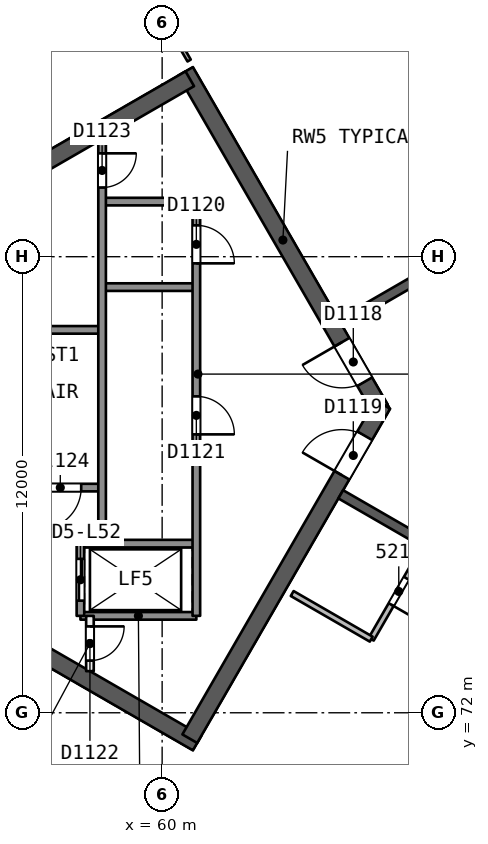
"""IFC4 building model, lengths in metres.
Left out: names, types, materials, properties, quantities, classifications, styles, units other than length and angle.
Written with IfcOpenShell. Run it as: python <this file> out.ifc"""

import sys

from ifc_helpers import new_model, si_unit, direction, frame, frame_2d, origin, place, context, subcontext, project, spatial, rectangle, extrude, element, fill, save


model = new_model("IFC4")
c1 = context("Model", 3, precision=1e-05, world=origin(), true_north=direction((0.0, 1.0)))
c2 = subcontext(c1, "Body", "Model", "MODEL_VIEW")
j1 = project(units=[si_unit("LENGTHUNIT", "METRE"), si_unit("PLANEANGLEUNIT", "RADIAN")], contexts=[c1])
p1 = place(None, origin())
s1 = spatial("IfcSite", under=j1, at=p1, CompositionType="ELEMENT")
p2 = place(p1, origin())
s2 = spatial("IfcBuilding", under=s1, at=p2, CompositionType="ELEMENT")
p3 = place(p2, frame((0.0, 0.0, 213.2)))
s3 = spatial("IfcBuildingStorey", under=s2, at=p3, CompositionType="ELEMENT", Elevation=213.2)
p4 = place(p3, frame((65.74, 80.0, 0.0), z_axis=(0.0, 0.0, 1.0), x_axis=(-0.499991857942, 0.866030104553, 0.0)))
e1 = element("IfcWall", 1, at=p4, inside=s3, PredefinedType="SHEAR", context=c2, shape_type="SweptSolid", body=[
    extrude(rectangle(XDim=10.25, YDim=0.45, at=frame_2d((5.125, 0.0))), origin(), (0.0, 0.0, 1.0), 3.7),
])
p5 = place(p4, frame((0.82, 0.0, 0.0)))
e2 = element("IfcOpeningElement", 2, at=p5, cuts=e1, PredefinedType="OPENING", context=c2, shape_type="SweptSolid", body=[
    extrude(rectangle(XDim=1.2, YDim=2.1, at=frame_2d((0.6, 1.05))), frame((0.0, 0.235, 0.0), z_axis=(0.0, -1.0, 0.0), x_axis=(1.0, 0.0, 0.0)), (0.0, 0.0, 1.0), 0.471),
])
p6 = place(p3, frame((60.728, 88.682, 0.0), z_axis=(0.0, 0.0, 1.0), x_axis=(-0.866021613849, -0.500006564303, 0.0)))
e3 = element("IfcWall", 3, at=p6, inside=s3, PredefinedType="SHEAR", context=c2, shape_type="SweptSolid", body=[
    extrude(rectangle(XDim=14.108, YDim=0.45, at=frame_2d((7.054, 0.0))), origin(), (0.0, 0.0, 1.0), 3.7),
])
p7 = place(p3, frame((48.622, 78.307, 0.0), z_axis=(0.0, 0.0, 1.0), x_axis=(0.86602701116, -0.499997215934, 0.0)))
e4 = element("IfcWall", 4, at=p7, inside=s3, PredefinedType="SHEAR", context=c2, shape_type="SweptSolid", body=[
    extrude(rectangle(XDim=14.204, YDim=0.45, at=frame_2d((7.102, 0.0))), origin(), (0.0, 0.0, 1.0), 3.7),
])
p8 = place(p3, frame((60.728, 71.318, 0.0), z_axis=(0.0, 0.0, 1.0), x_axis=(0.500012416173, 0.866018235185, 0.0)))
e5 = element("IfcWall", 5, at=p8, inside=s3, PredefinedType="SHEAR", context=c2, shape_type="SweptSolid", body=[
    extrude(rectangle(XDim=10.155, YDim=0.45, at=frame_2d((5.078, 0.0))), origin(), (0.0, 0.0, 1.0), 3.7),
])
p9 = place(p8, frame((8.005, 0.0, 0.0)))
e6 = element("IfcOpeningElement", 6, at=p9, cuts=e5, PredefinedType="OPENING", context=c2, shape_type="SweptSolid", body=[
    extrude(rectangle(XDim=1.2, YDim=2.1, at=frame_2d((0.6, 1.05))), frame((0.0, 0.235, 0.0), z_axis=(0.0, -1.0, 0.0), x_axis=(1.0, 0.0, 0.0)), (0.0, 0.0, 1.0), 0.471),
])
p10 = place(p3, frame((78.2, 90.046, 0.0), z_axis=(0.0, 0.0, 1.0), x_axis=(-0.866026492143, -0.499998114903, 0.0)))
e7 = element("IfcWall", 7, at=p10, inside=s3, PredefinedType="SHEAR", context=c2, shape_type="SweptSolid", body=[
    extrude(rectangle(XDim=15.588, YDim=0.25, at=frame_2d((7.794, 0.0))), origin(), (0.0, 0.0, 1.0), 3.3),
])
p11 = place(p10, frame((2.462, 0.0, 0.0)))
e8 = element("IfcOpeningElement", 8, at=p11, cuts=e7, PredefinedType="OPENING", context=c2, shape_type="SweptSolid", body=[
    extrude(rectangle(XDim=1.0, YDim=2.1, at=frame_2d((0.5, 1.05))), frame((0.0, 0.135, 0.0), z_axis=(0.0, -1.0, 0.0), x_axis=(1.0, 0.0, 0.0)), (0.0, 0.0, 1.0), 0.271),
])
p12 = place(p10, frame((8.003, 0.0, 0.0)))
e9 = element("IfcOpeningElement", 9, at=p12, cuts=e7, PredefinedType="OPENING", context=c2, shape_type="SweptSolid", body=[
    extrude(rectangle(XDim=1.1, YDim=2.1, at=frame_2d((0.55, 1.05))), frame((0.0, 0.135, 0.0), z_axis=(0.0, -1.0, 0.0), x_axis=(1.0, 0.0, 0.0)), (0.0, 0.0, 1.0), 0.271),
])
p13 = place(p10, frame((11.971, 0.0, 0.0)))
e10 = element("IfcOpeningElement", 10, at=p13, cuts=e7, PredefinedType="OPENING", context=c2, shape_type="SweptSolid", body=[
    extrude(rectangle(XDim=1.0, YDim=2.1, at=frame_2d((0.5, 1.05))), frame((0.0, 0.135, 0.0), z_axis=(0.0, -1.0, 0.0), x_axis=(1.0, 0.0, 0.0)), (0.0, 0.0, 1.0), 0.271),
])
p14 = place(p3, frame((64.7, 77.748, 0.0), z_axis=(0.0, 0.0, 1.0), x_axis=(0.866026492143, -0.499998114903, 0.0)))
e11 = element("IfcWall", 11, at=p14, inside=s3, PredefinedType="SHEAR", context=c2, shape_type="SweptSolid", body=[
    extrude(rectangle(XDim=15.588, YDim=0.25, at=frame_2d((7.794, 0.0))), origin(), (0.0, 0.0, 1.0), 3.3),
])
p15 = place(p14, frame((3.45, 0.0, 0.0)))
e12 = element("IfcOpeningElement", 12, at=p15, cuts=e11, PredefinedType="OPENING", context=c2, shape_type="SweptSolid", body=[
    extrude(rectangle(XDim=1.0, YDim=2.1, at=frame_2d((0.5, 1.05))), frame((0.0, 0.135, 0.0), z_axis=(0.0, -1.0, 0.0), x_axis=(1.0, 0.0, 0.0)), (0.0, 0.0, 1.0), 0.271),
])
p16 = place(p14, frame((8.003, 0.0, 0.0)))
e13 = element("IfcOpeningElement", 13, at=p16, cuts=e11, PredefinedType="OPENING", context=c2, shape_type="SweptSolid", body=[
    extrude(rectangle(XDim=1.1, YDim=2.1, at=frame_2d((0.55, 1.05))), frame((0.0, 0.135, 0.0), z_axis=(0.0, -1.0, 0.0), x_axis=(1.0, 0.0, 0.0)), (0.0, 0.0, 1.0), 0.271),
])
p17 = place(p14, frame((11.971, 0.0, 0.0)))
e14 = element("IfcOpeningElement", 14, at=p17, cuts=e11, PredefinedType="OPENING", context=c2, shape_type="SweptSolid", body=[
    extrude(rectangle(XDim=1.0, YDim=2.1, at=frame_2d((0.5, 1.05))), frame((0.0, 0.135, 0.0), z_axis=(0.0, -1.0, 0.0), x_axis=(1.0, 0.0, 0.0)), (0.0, 0.0, 1.0), 0.271),
])
p18 = place(p3, frame((64.824, 94.508, 0.0), z_axis=(0.0, 0.0, 1.0), x_axis=(0.500010840071, -0.866019145176, 0.0)))
e15 = element("IfcWall", 15, at=p18, inside=s3, PredefinedType="PARTITIONING", context=c2, shape_type="SweptSolid", body=[
    extrude(rectangle(XDim=10.552, YDim=0.2, at=frame_2d((5.276, 0.0))), origin(), (0.0, 0.0, 1.0), 3.3),
])
p19 = place(p3, frame((59.424, 91.39, 0.0), z_axis=(0.0, 0.0, 1.0), x_axis=(0.49995513091, -0.866051307416, 0.0)))
e16 = element("IfcWall", 16, at=p19, inside=s3, PredefinedType="PARTITIONING", context=c2, shape_type="SweptSolid", body=[
    extrude(rectangle(XDim=2.573, YDim=0.1, at=frame_2d((1.287, 0.0))), origin(), (0.0, 0.0, 1.0), 3.3),
])
p20 = place(p19, frame((0.837, 0.0, 0.0)))
e17 = element("IfcOpeningElement", 17, at=p20, cuts=e16, PredefinedType="OPENING", context=c2, shape_type="SweptSolid", body=[
    extrude(rectangle(XDim=0.9, YDim=2.1, at=frame_2d((0.45, 1.05))), frame((0.0, 0.061, 0.0), z_axis=(0.0, -1.0, 0.0), x_axis=(1.0, 0.0, 0.0)), (0.0, 0.0, 1.0), 0.121),
])
p21 = place(p3, frame((66.952, 76.448, 0.0), z_axis=(0.0, 0.0, 1.0), x_axis=(-0.499987231761, -0.866032775405, 0.0)))
e18 = element("IfcWall", 18, at=p21, inside=s3, PredefinedType="PARTITIONING", context=c2, shape_type="SweptSolid", body=[
    extrude(rectangle(XDim=2.9, YDim=0.15, at=frame_2d((1.45, 0.0))), origin(), (0.0, 0.0, 1.0), 3.3),
])
p22 = place(p21, frame((1.05, 0.0, 0.0)))
e19 = element("IfcOpeningElement", 19, at=p22, cuts=e18, PredefinedType="OPENING", context=c2, shape_type="SweptSolid", body=[
    extrude(rectangle(XDim=0.8, YDim=2.1, at=frame_2d((0.4, 1.05))), frame((0.0, 0.085, 0.0), z_axis=(0.0, -1.0, 0.0), x_axis=(1.0, 0.0, 0.0)), (0.0, 0.0, 1.0), 0.171),
])
p23 = place(p3, frame((65.502, 73.937, 0.0), z_axis=(0.0, 0.0, 1.0), x_axis=(-0.865994240961, 0.500053971709, 0.0)))
e20 = element("IfcWall", 20, at=p23, inside=s3, PredefinedType="PARTITIONING", context=c2, shape_type="SweptSolid", body=[
    extrude(rectangle(XDim=2.401, YDim=0.15, at=frame_2d((1.201, 0.0))), origin(), (0.0, 0.0, 1.0), 3.3),
])
p24 = place(p3, frame((64.014, 65.96, 0.0), z_axis=(0.0, 0.0, 1.0), x_axis=(0.499980879723, 0.8660364426, 0.0)))
e21 = element("IfcWall", 21, at=p24, inside=s3, PredefinedType="PARTITIONING", context=c2, shape_type="SweptSolid", body=[
    extrude(rectangle(XDim=7.006, YDim=0.2, at=frame_2d((3.503, 0.0))), origin(), (0.0, 0.0, 1.0), 3.3),
])
p25 = place(p3, frame((43.933, 82.619, 0.0), z_axis=(0.0, 0.0, 1.0), x_axis=(0.866026349667, 0.49999836168, 0.0)))
e22 = element("IfcWall", 22, at=p25, inside=s3, PredefinedType="SOLIDWALL", context=c2, shape_type="SweptSolid", body=[
    extrude(rectangle(XDim=51.192, YDim=0.3, at=frame_2d((25.596, 0.0))), origin(), (0.0, 0.0, 1.0), 3.3),
])
p26 = place(p25, frame((24.552, 0.0, 0.0)))
e23 = element("IfcOpeningElement", 23, at=p26, cuts=e22, PredefinedType="OPENING", context=c2, shape_type="SweptSolid", body=[
    extrude(rectangle(XDim=2.4, YDim=2.4, at=frame_2d((1.2, 1.2))), frame((0.0, 0.161, 0.0), z_axis=(0.0, -1.0, 0.0), x_axis=(1.0, 0.0, 0.0)), (0.0, 0.0, 1.0), 0.321),
])
p27 = place(p25, frame((29.228, 0.0, 0.0)))
e24 = element("IfcOpeningElement", 24, at=p27, cuts=e22, PredefinedType="OPENING", context=c2, shape_type="SweptSolid", body=[
    extrude(rectangle(XDim=2.4, YDim=2.4, at=frame_2d((1.2, 1.2))), frame((0.0, 0.161, 0.0), z_axis=(0.0, -1.0, 0.0), x_axis=(1.0, 0.0, 0.0)), (0.0, 0.0, 1.0), 0.321),
])
p28 = place(p25, frame((39.819, 0.0, 0.0)))
e25 = element("IfcOpeningElement", 25, at=p28, cuts=e22, PredefinedType="OPENING", context=c2, shape_type="SweptSolid", body=[
    extrude(rectangle(XDim=2.4, YDim=2.4, at=frame_2d((1.2, 1.2))), frame((0.0, 0.161, 0.0), z_axis=(0.0, -1.0, 0.0), x_axis=(1.0, 0.0, 0.0)), (0.0, 0.0, 1.0), 0.321),
])
p29 = place(p25, frame((19.719, 0.0, 0.0)))
e26 = element("IfcOpeningElement", 26, at=p29, cuts=e22, PredefinedType="OPENING", context=c2, shape_type="SweptSolid", body=[
    extrude(rectangle(XDim=2.4, YDim=2.4, at=frame_2d((1.2, 1.2))), frame((0.0, 0.161, 0.0), z_axis=(0.0, -1.0, 0.0), x_axis=(1.0, 0.0, 0.0)), (0.0, 0.0, 1.0), 0.321),
])
p30 = place(p25, frame((8.993, 0.0, 0.0)))
e27 = element("IfcOpeningElement", 27, at=p30, cuts=e22, PredefinedType="OPENING", context=c2, shape_type="SweptSolid", body=[
    extrude(rectangle(XDim=2.4, YDim=2.4, at=frame_2d((1.2, 1.2))), frame((0.0, 0.161, 0.0), z_axis=(0.0, -1.0, 0.0), x_axis=(1.0, 0.0, 0.0)), (0.0, 0.0, 1.0), 0.321),
])
p31 = place(p3, frame((88.266, 51.786, 0.0), z_axis=(0.0, 0.0, 1.0), x_axis=(-0.866026349667, 0.49999836168, 0.0)))
e28 = element("IfcWall", 28, at=p31, inside=s3, PredefinedType="SOLIDWALL", context=c2, shape_type="SweptSolid", body=[
    extrude(rectangle(XDim=51.192, YDim=0.3, at=frame_2d((25.596, 0.0))), origin(), (0.0, 0.0, 1.0), 3.3),
])
p32 = place(p31, frame((24.864, 0.0, 0.0)))
e29 = element("IfcOpeningElement", 29, at=p32, cuts=e28, PredefinedType="OPENING", context=c2, shape_type="SweptSolid", body=[
    extrude(rectangle(XDim=2.4, YDim=2.4, at=frame_2d((1.2, 1.2))), frame((0.0, 0.161, 0.0), z_axis=(0.0, -1.0, 0.0), x_axis=(1.0, 0.0, 0.0)), (0.0, 0.0, 1.0), 0.321),
])
p33 = place(p31, frame((19.719, 0.0, 0.0)))
e30 = element("IfcOpeningElement", 30, at=p33, cuts=e28, PredefinedType="OPENING", context=c2, shape_type="SweptSolid", body=[
    extrude(rectangle(XDim=2.4, YDim=2.4, at=frame_2d((1.2, 1.2))), frame((0.0, 0.161, 0.0), z_axis=(0.0, -1.0, 0.0), x_axis=(1.0, 0.0, 0.0)), (0.0, 0.0, 1.0), 0.321),
])
p34 = place(p31, frame((8.993, 0.0, 0.0)))
e31 = element("IfcOpeningElement", 31, at=p34, cuts=e28, PredefinedType="OPENING", context=c2, shape_type="SweptSolid", body=[
    extrude(rectangle(XDim=2.4, YDim=2.4, at=frame_2d((1.2, 1.2))), frame((0.0, 0.161, 0.0), z_axis=(0.0, -1.0, 0.0), x_axis=(1.0, 0.0, 0.0)), (0.0, 0.0, 1.0), 0.321),
])
p35 = place(p31, frame((38.484, 0.0, 0.0)))
e32 = element("IfcOpeningElement", 32, at=p35, cuts=e28, PredefinedType="OPENING", context=c2, shape_type="SweptSolid", body=[
    extrude(rectangle(XDim=2.4, YDim=2.4, at=frame_2d((1.2, 1.2))), frame((0.0, 0.161, 0.0), z_axis=(0.0, -1.0, 0.0), x_axis=(1.0, 0.0, 0.0)), (0.0, 0.0, 1.0), 0.321),
])
for number, where, z_axis, x_axis in (
    (33, (60.9, 85.45, 0.0), (0.0, 0.0, 1.0), (-1.0, 0.0, 0.0)),
    (34, (60.9, 83.2, 0.0), (0.0, 0.0, 1.0), (-1.0, 0.0, 0.0)),
):
    element("IfcWall", number, at=place(p3, frame(where, z_axis=z_axis, x_axis=x_axis)), inside=s3, PredefinedType="SOLIDWALL", context=c2, shape_type="SweptSolid", body=[
        extrude(rectangle(XDim=2.48, YDim=0.2, at=frame_2d((1.24, 0.0))), origin(), (0.0, 0.0, 1.0), 3.3),
    ])
p36 = place(p3, frame((58.42, 82.075, 0.0), z_axis=(0.0, 0.0, 1.0), x_axis=(-1.0, 0.0, 0.0)))
e35 = element("IfcWall", 35, at=p36, inside=s3, PredefinedType="SOLIDWALL", context=c2, shape_type="SweptSolid", body=[
    extrude(rectangle(XDim=7.7, YDim=0.2, at=frame_2d((3.85, 0.0))), origin(), (0.0, 0.0, 1.0), 3.3),
])
p37 = place(p3, frame((58.42, 77.925, 0.0), z_axis=(0.0, 0.0, 1.0), x_axis=(-1.0, 0.0, 0.0)))
e36 = element("IfcWall", 36, at=p37, inside=s3, PredefinedType="SOLIDWALL", context=c2, shape_type="SweptSolid", body=[
    extrude(rectangle(XDim=7.7, YDim=0.2, at=frame_2d((3.85, 0.0))), origin(), (0.0, 0.0, 1.0), 3.3),
])
p38 = place(p37, frame((0.55, 0.0, 0.0)))
e37 = element("IfcOpeningElement", 37, at=p38, cuts=e36, PredefinedType="OPENING", context=c2, shape_type="SweptSolid", body=[
    extrude(rectangle(XDim=1.1, YDim=2.1, at=frame_2d((0.55, 1.05))), frame((0.0, 0.11, 0.0), z_axis=(0.0, -1.0, 0.0), x_axis=(1.0, 0.0, 0.0)), (0.0, 0.0, 1.0), 0.221),
])
for number, where, z_axis, x_axis in (
    (38, (60.9, 76.45, 0.0), (0.0, 0.0, 1.0), (-1.0, 0.0, 0.0)),
    (39, (60.9, 74.55, 0.0), (0.0, 0.0, 1.0), (-1.0, 0.0, 0.0)),
):
    element("IfcWall", number, at=place(p3, frame(where, z_axis=z_axis, x_axis=x_axis)), inside=s3, PredefinedType="SOLIDWALL", context=c2, shape_type="SweptSolid", body=[
        extrude(rectangle(XDim=3.05, YDim=0.2, at=frame_2d((1.525, 0.0))), origin(), (0.0, 0.0, 1.0), 3.3),
    ])
p39 = place(p3, frame((60.9, 85.45, 0.0), z_axis=(0.0, 0.0, 1.0), x_axis=(0.0, -1.0, 0.0)))
e40 = element("IfcWall", 40, at=p39, inside=s3, PredefinedType="SOLIDWALL", context=c2, shape_type="SweptSolid", body=[
    extrude(rectangle(XDim=10.9, YDim=0.2, at=frame_2d((5.45, 0.0))), origin(), (0.0, 0.0, 1.0), 3.3),
])
p40 = place(p39, frame((0.625, 0.0, 0.0)))
e41 = element("IfcOpeningElement", 41, at=p40, cuts=e40, PredefinedType="OPENING", context=c2, shape_type="SweptSolid", body=[
    extrude(rectangle(XDim=1.0, YDim=2.1, at=frame_2d((0.5, 1.05))), frame((0.0, 0.11, 0.0), z_axis=(0.0, -1.0, 0.0), x_axis=(1.0, 0.0, 0.0)), (0.0, 0.0, 1.0), 0.221),
])
p41 = place(p39, frame((5.125, 0.0, 0.0)))
e42 = element("IfcOpeningElement", 42, at=p41, cuts=e40, PredefinedType="OPENING", context=c2, shape_type="SweptSolid", body=[
    extrude(rectangle(XDim=1.0, YDim=2.1, at=frame_2d((0.5, 1.05))), frame((0.0, 0.11, 0.0), z_axis=(0.0, -1.0, 0.0), x_axis=(1.0, 0.0, 0.0)), (0.0, 0.0, 1.0), 0.221),
])
p42 = place(p3, frame((58.42, 87.09, 0.0), z_axis=(0.0, 0.0, 1.0), x_axis=(0.0, -1.0, 0.0)))
e43 = element("IfcWall", 43, at=p42, inside=s3, PredefinedType="SOLIDWALL", context=c2, shape_type="SweptSolid", body=[
    extrude(rectangle(XDim=10.64, YDim=0.2, at=frame_2d((5.32, 0.0))), origin(), (0.0, 0.0, 1.0), 3.3),
])
p43 = place(p42, frame((0.37, 0.0, 0.0)))
e44 = element("IfcOpeningElement", 44, at=p43, cuts=e43, PredefinedType="OPENING", context=c2, shape_type="SweptSolid", body=[
    extrude(rectangle(XDim=0.9, YDim=2.1, at=frame_2d((0.45, 1.05))), frame((0.0, 0.11, 0.0), z_axis=(0.0, -1.0, 0.0), x_axis=(1.0, 0.0, 0.0)), (0.0, 0.0, 1.0), 0.221),
])
p44 = place(p3, frame((58.1, 74.55, 0.0), z_axis=(0.0, 0.0, 1.0), x_axis=(0.0, -1.0, 0.0)))
e45 = element("IfcWall", 45, at=p44, inside=s3, PredefinedType="PARTITIONING", context=c2, shape_type="SweptSolid", body=[
    extrude(rectangle(XDim=1.455, YDim=0.2, at=frame_2d((0.728, 0.0))), origin(), (0.0, 0.0, 1.0), 3.3),
])
p45 = place(p44, frame((0.278, 0.0, 0.0)))
e46 = element("IfcOpeningElement", 46, at=p45, cuts=e45, PredefinedType="OPENING", context=c2, shape_type="SweptSolid", body=[
    extrude(rectangle(XDim=0.9, YDim=2.1, at=frame_2d((0.45, 1.05))), frame((0.0, 0.11, 0.0), z_axis=(0.0, -1.0, 0.0), x_axis=(1.0, 0.0, 0.0)), (0.0, 0.0, 1.0), 0.221),
])
p46 = place(p3, frame((57.85, 76.45, 0.0), z_axis=(0.0, 0.0, 1.0), x_axis=(0.0, -1.0, 0.0)))
e47 = element("IfcWall", 47, at=p46, inside=s3, PredefinedType="SOLIDWALL", context=c2, shape_type="SweptSolid", body=[
    extrude(rectangle(XDim=1.9, YDim=0.2, at=frame_2d((0.95, 0.0))), origin(), (0.0, 0.0, 1.0), 3.3),
])
p47 = place(p46, frame((0.4, 0.0, 0.0)))
e48 = element("IfcOpeningElement", 48, at=p47, cuts=e47, PredefinedType="OPENING", context=c2, shape_type="SweptSolid", body=[
    extrude(rectangle(XDim=1.1, YDim=2.1, at=frame_2d((0.55, 1.05))), frame((0.0, 0.11, 0.0), z_axis=(0.0, -1.0, 0.0), x_axis=(1.0, 0.0, 0.0)), (0.0, 0.0, 1.0), 0.221),
])
p48 = place(p22, origin())
e49 = element("IfcDoor", 49, at=p48, inside=s3, OperationType="SINGLE_SWING_RIGHT", PredefinedType="NOTDEFINED", context=c2, shape_type="SweptSolid", body=[
    extrude(rectangle(XDim=0.8, YDim=2.1, at=frame_2d((0.4, 1.05))), frame((0.0, 0.025, 0.0), z_axis=(0.0, -1.0, 0.0), x_axis=(1.0, 0.0, 0.0)), (0.0, 0.0, 1.0), 0.05),
])
fill(e19, e49)
p49 = place(p5, origin())
e50 = element("IfcDoor", 50, at=p49, inside=s3, OperationType="SINGLE_SWING_RIGHT", PredefinedType="NOTDEFINED", context=c2, shape_type="SweptSolid", body=[
    extrude(rectangle(XDim=1.2, YDim=2.1, at=frame_2d((0.6, 1.05))), frame((0.0, 0.025, 0.0), z_axis=(0.0, -1.0, 0.0), x_axis=(1.0, 0.0, 0.0)), (0.0, 0.0, 1.0), 0.05),
])
fill(e2, e50)
p50 = place(p9, origin())
e51 = element("IfcDoor", 51, at=p50, inside=s3, OperationType="SINGLE_SWING_LEFT", PredefinedType="NOTDEFINED", context=c2, shape_type="SweptSolid", body=[
    extrude(rectangle(XDim=1.2, YDim=2.1, at=frame_2d((0.6, 1.05))), frame((0.0, 0.025, 0.0), z_axis=(0.0, -1.0, 0.0), x_axis=(1.0, 0.0, 0.0)), (0.0, 0.0, 1.0), 0.05),
])
fill(e6, e51)
p51 = place(p47, origin())
e52 = element("IfcDoor", 52, at=p51, inside=s3, OperationType="SLIDING_TO_RIGHT", PredefinedType="NOTDEFINED", context=c2, shape_type="SweptSolid", body=[
    extrude(rectangle(XDim=1.1, YDim=2.1, at=frame_2d((0.55, 1.05))), frame((0.0, 0.025, 0.0), z_axis=(0.0, -1.0, 0.0), x_axis=(1.0, 0.0, 0.0)), (0.0, 0.0, 1.0), 0.05),
])
fill(e48, e52)
p52 = place(p40, origin())
e53 = element("IfcDoor", 53, at=p52, inside=s3, OperationType="SINGLE_SWING_RIGHT", PredefinedType="NOTDEFINED", context=c2, shape_type="SweptSolid", body=[
    extrude(rectangle(XDim=1.0, YDim=2.1, at=frame_2d((0.5, 1.05))), frame((0.0, 0.025, 0.0), z_axis=(0.0, -1.0, 0.0), x_axis=(1.0, 0.0, 0.0)), (0.0, 0.0, 1.0), 0.05),
])
fill(e41, e53)
p53 = place(p41, origin())
e54 = element("IfcDoor", 54, at=p53, inside=s3, OperationType="SINGLE_SWING_RIGHT", PredefinedType="NOTDEFINED", context=c2, shape_type="SweptSolid", body=[
    extrude(rectangle(XDim=1.0, YDim=2.1, at=frame_2d((0.5, 1.05))), frame((0.0, 0.025, 0.0), z_axis=(0.0, -1.0, 0.0), x_axis=(1.0, 0.0, 0.0)), (0.0, 0.0, 1.0), 0.05),
])
fill(e42, e54)
p54 = place(p45, origin())
e55 = element("IfcDoor", 55, at=p54, inside=s3, OperationType="SINGLE_SWING_LEFT", PredefinedType="NOTDEFINED", context=c2, shape_type="SweptSolid", body=[
    extrude(rectangle(XDim=0.9, YDim=2.1, at=frame_2d((0.45, 1.05))), frame((0.0, 0.025, 0.0), z_axis=(0.0, -1.0, 0.0), x_axis=(1.0, 0.0, 0.0)), (0.0, 0.0, 1.0), 0.05),
])
fill(e46, e55)
p55 = place(p43, origin())
e56 = element("IfcDoor", 56, at=p55, inside=s3, OperationType="SINGLE_SWING_LEFT", PredefinedType="NOTDEFINED", context=c2, shape_type="SweptSolid", body=[
    extrude(rectangle(XDim=0.9, YDim=2.1, at=frame_2d((0.45, 1.05))), frame((0.0, 0.025, 0.0), z_axis=(0.0, -1.0, 0.0), x_axis=(1.0, 0.0, 0.0)), (0.0, 0.0, 1.0), 0.05),
])
fill(e44, e56)
p56 = place(p38, origin())
e57 = element("IfcDoor", 57, at=p56, inside=s3, OperationType="SINGLE_SWING_RIGHT", PredefinedType="NOTDEFINED", context=c2, shape_type="SweptSolid", body=[
    extrude(rectangle(XDim=1.1, YDim=2.1, at=frame_2d((0.55, 1.05))), frame((0.0, 0.025, 0.0), z_axis=(0.0, -1.0, 0.0), x_axis=(1.0, 0.0, 0.0)), (0.0, 0.0, 1.0), 0.05),
])
fill(e37, e57)
save(model, sys.argv[1])
